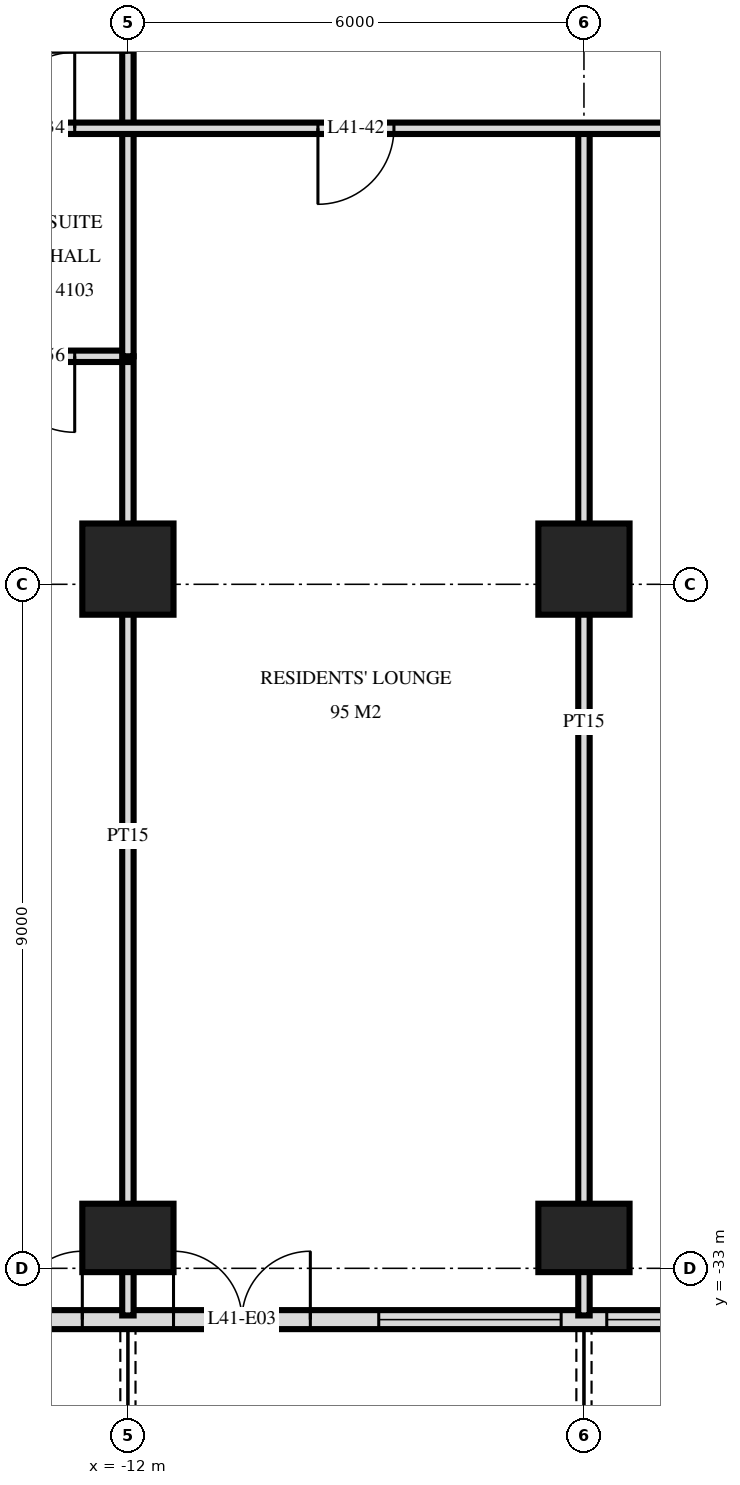
"""IFC4 building model, lengths in metres.
Left out: names, types, materials, properties, quantities, classifications, styles, units other than length and angle.
Written with IfcOpenShell. Run it as: python <this file> out.ifc"""

import sys

from ifc_helpers import new_model, si_unit, direction, frame, frame_2d, origin, origin_2d, place, context, subcontext, project, spatial, rectangle, extrude, element, fill, save


model = new_model("IFC4")
c1 = context("Model", 3, precision=1e-05, world=origin(), true_north=direction((0.0, 1.0)))
c2 = subcontext(c1, "Body", "Model", "MODEL_VIEW")
j1 = project(units=[si_unit("LENGTHUNIT", "METRE"), si_unit("PLANEANGLEUNIT", "RADIAN")], contexts=[c1])
p1 = place(None, origin())
s1 = spatial("IfcSite", under=j1, at=p1, CompositionType="ELEMENT")
p2 = place(p1, origin())
s2 = spatial("IfcBuilding", under=s1, at=p2, CompositionType="ELEMENT")
p3 = place(p2, frame((0.0, 0.0, 159.6)))
s3 = spatial("IfcBuildingStorey", under=s2, at=p3, CompositionType="ELEMENT", Elevation=159.6)
p4 = place(p3, frame((-12.0, -32.6, 0.0), z_axis=(0.0, 0.0, 1.0), x_axis=(1.0, 0.0, 0.0)))
e1 = element("IfcColumn", 1, at=p4, inside=s3, PredefinedType="COLUMN", context=c2, shape_type="SweptSolid", body=[
    extrude(rectangle(XDim=1.2, YDim=0.9, at=origin_2d()), origin(), (0.0, 0.0, 1.0), 3.6),
])
p5 = place(p3, frame((-12.0, -23.8, 0.0), z_axis=(0.0, 0.0, 1.0), x_axis=(1.0, 0.0, 0.0)))
e2 = element("IfcColumn", 2, at=p5, inside=s3, PredefinedType="COLUMN", context=c2, shape_type="SweptSolid", body=[
    extrude(rectangle(XDim=1.2, YDim=1.2, at=origin_2d()), origin(), (0.0, 0.0, 1.0), 3.6),
])
p6 = place(p3, frame((-6.0, -32.6, 0.0), z_axis=(0.0, 0.0, 1.0), x_axis=(1.0, 0.0, 0.0)))
e3 = element("IfcColumn", 3, at=p6, inside=s3, PredefinedType="COLUMN", context=c2, shape_type="SweptSolid", body=[
    extrude(rectangle(XDim=1.2, YDim=0.9, at=origin_2d()), origin(), (0.0, 0.0, 1.0), 3.6),
])
p7 = place(p3, frame((-6.0, -23.8, 0.0), z_axis=(0.0, 0.0, 1.0), x_axis=(1.0, 0.0, 0.0)))
e4 = element("IfcColumn", 4, at=p7, inside=s3, PredefinedType="COLUMN", context=c2, shape_type="SweptSolid", body=[
    extrude(rectangle(XDim=1.2, YDim=1.2, at=origin_2d()), origin(), (0.0, 0.0, 1.0), 3.6),
])
p8 = place(p3, frame((-23.675, -33.675, 0.0), z_axis=(0.0, 0.0, 1.0), x_axis=(1.0, 0.0, 0.0)))
e5 = element("IfcWall", 5, at=p8, inside=s3, PredefinedType="SOLIDWALL", context=c2, shape_type="SweptSolid", body=[
    extrude(rectangle(XDim=47.351, YDim=0.25, at=frame_2d((23.675, 0.0))), origin(), (0.0, 0.0, 1.0), 3.32),
])
p9 = place(p8, frame((0.575, 0.0, 0.0)))
e6 = element("IfcOpeningElement", 6, at=p9, cuts=e5, PredefinedType="OPENING", context=c2, shape_type="SweptSolid", body=[
    extrude(rectangle(XDim=1.8, YDim=2.4, at=frame_2d((0.9, 1.2))), frame((0.0, 0.135, 0.0), z_axis=(0.0, -1.0, 0.0), x_axis=(1.0, 0.0, 0.0)), (0.0, 0.0, 1.0), 0.27),
])
p10 = place(p8, frame((3.425, 0.0, 0.3)))
e7 = element("IfcOpeningElement", 7, at=p10, cuts=e5, PredefinedType="OPENING", context=c2, shape_type="SweptSolid", body=[
    extrude(rectangle(XDim=1.8, YDim=2.1, at=frame_2d((0.9, 1.05))), frame((0.0, 0.135, 0.0), z_axis=(0.0, -1.0, 0.0), x_axis=(1.0, 0.0, 0.0)), (0.0, 0.0, 1.0), 0.27),
])
p11 = place(p8, frame((5.975, 0.0, 0.3)))
e8 = element("IfcOpeningElement", 8, at=p11, cuts=e5, PredefinedType="OPENING", context=c2, shape_type="SweptSolid", body=[
    extrude(rectangle(XDim=2.4, YDim=2.1, at=frame_2d((1.2, 1.05))), frame((0.0, 0.135, 0.0), z_axis=(0.0, -1.0, 0.0), x_axis=(1.0, 0.0, 0.0)), (0.0, 0.0, 1.0), 0.27),
])
p12 = place(p8, frame((9.275, 0.0, 0.0)))
e9 = element("IfcOpeningElement", 9, at=p12, cuts=e5, PredefinedType="OPENING", context=c2, shape_type="SweptSolid", body=[
    extrude(rectangle(XDim=1.8, YDim=2.4, at=frame_2d((0.9, 1.2))), frame((0.0, 0.135, 0.0), z_axis=(0.0, -1.0, 0.0), x_axis=(1.0, 0.0, 0.0)), (0.0, 0.0, 1.0), 0.27),
])
p13 = place(p8, frame((12.275, 0.0, 0.0)))
e10 = element("IfcOpeningElement", 10, at=p13, cuts=e5, PredefinedType="OPENING", context=c2, shape_type="SweptSolid", body=[
    extrude(rectangle(XDim=1.8, YDim=2.4, at=frame_2d((0.9, 1.2))), frame((0.0, 0.135, 0.0), z_axis=(0.0, -1.0, 0.0), x_axis=(1.0, 0.0, 0.0)), (0.0, 0.0, 1.0), 0.27),
])
p14 = place(p8, frame((14.975, 0.0, 0.3)))
e11 = element("IfcOpeningElement", 11, at=p14, cuts=e5, PredefinedType="OPENING", context=c2, shape_type="SweptSolid", body=[
    extrude(rectangle(XDim=2.4, YDim=2.1, at=frame_2d((1.2, 1.05))), frame((0.0, 0.135, 0.0), z_axis=(0.0, -1.0, 0.0), x_axis=(1.0, 0.0, 0.0)), (0.0, 0.0, 1.0), 0.27),
])
p15 = place(p8, frame((17.975, 0.0, 0.3)))
e12 = element("IfcOpeningElement", 12, at=p15, cuts=e5, PredefinedType="OPENING", context=c2, shape_type="SweptSolid", body=[
    extrude(rectangle(XDim=2.4, YDim=2.1, at=frame_2d((1.2, 1.05))), frame((0.0, 0.135, 0.0), z_axis=(0.0, -1.0, 0.0), x_axis=(1.0, 0.0, 0.0)), (0.0, 0.0, 1.0), 0.27),
])
p16 = place(p8, frame((21.275, 0.0, 0.0)))
e13 = element("IfcOpeningElement", 13, at=p16, cuts=e5, PredefinedType="OPENING", context=c2, shape_type="SweptSolid", body=[
    extrude(rectangle(XDim=1.8, YDim=2.4, at=frame_2d((0.9, 1.2))), frame((0.0, 0.135, 0.0), z_axis=(0.0, -1.0, 0.0), x_axis=(1.0, 0.0, 0.0)), (0.0, 0.0, 1.0), 0.27),
])
p17 = place(p8, frame((24.275, 0.0, 0.0)))
e14 = element("IfcOpeningElement", 14, at=p17, cuts=e5, PredefinedType="OPENING", context=c2, shape_type="SweptSolid", body=[
    extrude(rectangle(XDim=1.8, YDim=2.4, at=frame_2d((0.9, 1.2))), frame((0.0, 0.135, 0.0), z_axis=(0.0, -1.0, 0.0), x_axis=(1.0, 0.0, 0.0)), (0.0, 0.0, 1.0), 0.27),
])
p18 = place(p8, frame((26.975, 0.0, 0.3)))
e15 = element("IfcOpeningElement", 15, at=p18, cuts=e5, PredefinedType="OPENING", context=c2, shape_type="SweptSolid", body=[
    extrude(rectangle(XDim=2.4, YDim=2.1, at=frame_2d((1.2, 1.05))), frame((0.0, 0.135, 0.0), z_axis=(0.0, -1.0, 0.0), x_axis=(1.0, 0.0, 0.0)), (0.0, 0.0, 1.0), 0.27),
])
p19 = place(p8, frame((30.275, 0.0, 0.0)))
e16 = element("IfcOpeningElement", 16, at=p19, cuts=e5, PredefinedType="OPENING", context=c2, shape_type="SweptSolid", body=[
    extrude(rectangle(XDim=1.8, YDim=2.4, at=frame_2d((0.9, 1.2))), frame((0.0, 0.135, 0.0), z_axis=(0.0, -1.0, 0.0), x_axis=(1.0, 0.0, 0.0)), (0.0, 0.0, 1.0), 0.27),
])
p20 = place(p8, frame((32.975, 0.0, 0.3)))
e17 = element("IfcOpeningElement", 17, at=p20, cuts=e5, PredefinedType="OPENING", context=c2, shape_type="SweptSolid", body=[
    extrude(rectangle(XDim=2.4, YDim=2.1, at=frame_2d((1.2, 1.05))), frame((0.0, 0.135, 0.0), z_axis=(0.0, -1.0, 0.0), x_axis=(1.0, 0.0, 0.0)), (0.0, 0.0, 1.0), 0.27),
])
p21 = place(p8, frame((36.275, 0.0, 0.0)))
e18 = element("IfcOpeningElement", 18, at=p21, cuts=e5, PredefinedType="OPENING", context=c2, shape_type="SweptSolid", body=[
    extrude(rectangle(XDim=1.8, YDim=2.4, at=frame_2d((0.9, 1.2))), frame((0.0, 0.135, 0.0), z_axis=(0.0, -1.0, 0.0), x_axis=(1.0, 0.0, 0.0)), (0.0, 0.0, 1.0), 0.27),
])
p22 = place(p8, frame((38.975, 0.0, 0.3)))
e19 = element("IfcOpeningElement", 19, at=p22, cuts=e5, PredefinedType="OPENING", context=c2, shape_type="SweptSolid", body=[
    extrude(rectangle(XDim=2.4, YDim=2.1, at=frame_2d((1.2, 1.05))), frame((0.0, 0.135, 0.0), z_axis=(0.0, -1.0, 0.0), x_axis=(1.0, 0.0, 0.0)), (0.0, 0.0, 1.0), 0.27),
])
p23 = place(p8, frame((41.975, 0.0, 0.3)))
e20 = element("IfcOpeningElement", 20, at=p23, cuts=e5, PredefinedType="OPENING", context=c2, shape_type="SweptSolid", body=[
    extrude(rectangle(XDim=2.4, YDim=2.1, at=frame_2d((1.2, 1.05))), frame((0.0, 0.135, 0.0), z_axis=(0.0, -1.0, 0.0), x_axis=(1.0, 0.0, 0.0)), (0.0, 0.0, 1.0), 0.27),
])
p24 = place(p8, frame((45.125, 0.0, 0.0)))
e21 = element("IfcOpeningElement", 21, at=p24, cuts=e5, PredefinedType="OPENING", context=c2, shape_type="SweptSolid", body=[
    extrude(rectangle(XDim=1.8, YDim=2.4, at=frame_2d((0.9, 1.2))), frame((0.0, 0.135, 0.0), z_axis=(0.0, -1.0, 0.0), x_axis=(1.0, 0.0, 0.0)), (0.0, 0.0, 1.0), 0.27),
])
p25 = place(p3, frame((-6.0, -33.62, 0.0), z_axis=(0.0, 0.0, 1.0), x_axis=(0.0, 1.0, 0.0)))
e22 = element("IfcWall", 22, at=p25, inside=s3, PredefinedType="PARTITIONING", context=c2, shape_type="SweptSolid", body=[
    extrude(rectangle(XDim=15.62, YDim=0.15, at=frame_2d((7.81, 0.0))), origin(), (0.0, 0.0, 1.0), 3.32),
])
p26 = place(p3, frame((-12.0, -21.0, 0.0), z_axis=(0.0, 0.0, 1.0), x_axis=(0.0, 1.0, 0.0)))
e23 = element("IfcWall", 23, at=p26, inside=s3, PredefinedType="PARTITIONING", context=c2, shape_type="SweptSolid", body=[
    extrude(rectangle(XDim=5.95, YDim=0.15, at=frame_2d((2.975, 0.0))), origin(), (0.0, 0.0, 1.0), 3.32),
])
p27 = place(p26, frame((4.0, 0.0, 0.0)))
e24 = element("IfcOpeningElement", 24, at=p27, cuts=e23, PredefinedType="OPENING", context=c2, shape_type="SweptSolid", body=[
    extrude(rectangle(XDim=1.0, YDim=2.1, at=frame_2d((0.5, 1.05))), frame((0.0, 0.085, 0.0), z_axis=(0.0, -1.0, 0.0), x_axis=(1.0, 0.0, 0.0)), (0.0, 0.0, 1.0), 0.17),
])
p28 = place(p3, frame((-12.0, -33.62, 0.0), z_axis=(0.0, 0.0, 1.0), x_axis=(0.0, 1.0, 0.0)))
e25 = element("IfcWall", 25, at=p28, inside=s3, PredefinedType="PARTITIONING", context=c2, shape_type="SweptSolid", body=[
    extrude(rectangle(XDim=12.62, YDim=0.15, at=frame_2d((6.31, 0.0))), origin(), (0.0, 0.0, 1.0), 3.32),
])
p29 = place(p3, frame((-14.4, -21.0, 0.0), z_axis=(0.0, 0.0, 1.0), x_axis=(1.0, 0.0, 0.0)))
e26 = element("IfcWall", 26, at=p29, inside=s3, PredefinedType="PARTITIONING", context=c2, shape_type="SweptSolid", body=[
    extrude(rectangle(XDim=2.4, YDim=0.15, at=frame_2d((1.2, 0.0))), origin(), (0.0, 0.0, 1.0), 3.32),
])
p30 = place(p29, frame((0.7, 0.0, 0.0)))
e27 = element("IfcOpeningElement", 27, at=p30, cuts=e26, PredefinedType="OPENING", context=c2, shape_type="SweptSolid", body=[
    extrude(rectangle(XDim=1.0, YDim=2.1, at=frame_2d((0.5, 1.05))), frame((0.0, 0.085, 0.0), z_axis=(0.0, -1.0, 0.0), x_axis=(1.0, 0.0, 0.0)), (0.0, 0.0, 1.0), 0.17),
])
p31 = place(p3, frame((-28.02, -18.0, 0.0), z_axis=(0.0, 0.0, 1.0), x_axis=(1.0, 0.0, 0.0)))
e28 = element("IfcWall", 28, at=p31, inside=s3, PredefinedType="PARTITIONING", context=c2, shape_type="SweptSolid", body=[
    extrude(rectangle(XDim=56.04, YDim=0.15, at=frame_2d((28.02, 0.0))), origin(), (0.0, 0.0, 1.0), 3.32),
])
p32 = place(p31, frame((14.32, 0.0, 0.0)))
e29 = element("IfcOpeningElement", 29, at=p32, cuts=e28, PredefinedType="OPENING", context=c2, shape_type="SweptSolid", body=[
    extrude(rectangle(XDim=1.0, YDim=2.1, at=frame_2d((0.5, 1.05))), frame((0.0, 0.085, 0.0), z_axis=(0.0, -1.0, 0.0), x_axis=(1.0, 0.0, 0.0)), (0.0, 0.0, 1.0), 0.17),
])
p33 = place(p31, frame((40.17, 0.0, 0.0)))
e30 = element("IfcOpeningElement", 30, at=p33, cuts=e28, PredefinedType="OPENING", context=c2, shape_type="SweptSolid", body=[
    extrude(rectangle(XDim=1.0, YDim=2.1, at=frame_2d((0.5, 1.05))), frame((0.0, 0.085, 0.0), z_axis=(0.0, -1.0, 0.0), x_axis=(1.0, 0.0, 0.0)), (0.0, 0.0, 1.0), 0.17),
])
p34 = place(p31, frame((44.87, 0.0, 0.0)))
e31 = element("IfcOpeningElement", 31, at=p34, cuts=e28, PredefinedType="OPENING", context=c2, shape_type="SweptSolid", body=[
    extrude(rectangle(XDim=1.0, YDim=2.1, at=frame_2d((0.5, 1.05))), frame((0.0, 0.085, 0.0), z_axis=(0.0, -1.0, 0.0), x_axis=(1.0, 0.0, 0.0)), (0.0, 0.0, 1.0), 0.17),
])
p35 = place(p31, frame((46.72, 0.0, 0.0)))
e32 = element("IfcOpeningElement", 32, at=p35, cuts=e28, PredefinedType="OPENING", context=c2, shape_type="SweptSolid", body=[
    extrude(rectangle(XDim=1.0, YDim=2.1, at=frame_2d((0.5, 1.05))), frame((0.0, 0.085, 0.0), z_axis=(0.0, -1.0, 0.0), x_axis=(1.0, 0.0, 0.0)), (0.0, 0.0, 1.0), 0.17),
])
p36 = place(p31, frame((18.52, 0.0, 0.0)))
e33 = element("IfcOpeningElement", 33, at=p36, cuts=e28, PredefinedType="OPENING", context=c2, shape_type="SweptSolid", body=[
    extrude(rectangle(XDim=1.0, YDim=2.1, at=frame_2d((0.5, 1.05))), frame((0.0, 0.085, 0.0), z_axis=(0.0, -1.0, 0.0), x_axis=(1.0, 0.0, 0.0)), (0.0, 0.0, 1.0), 0.17),
])
p37 = place(p31, frame((24.52, 0.0, 0.0)))
e34 = element("IfcOpeningElement", 34, at=p37, cuts=e28, PredefinedType="OPENING", context=c2, shape_type="SweptSolid", body=[
    extrude(rectangle(XDim=1.0, YDim=2.1, at=frame_2d((0.5, 1.05))), frame((0.0, 0.085, 0.0), z_axis=(0.0, -1.0, 0.0), x_axis=(1.0, 0.0, 0.0)), (0.0, 0.0, 1.0), 0.17),
])
p38 = place(p31, frame((30.52, 0.0, 0.0)))
e35 = element("IfcOpeningElement", 35, at=p38, cuts=e28, PredefinedType="OPENING", context=c2, shape_type="SweptSolid", body=[
    extrude(rectangle(XDim=1.0, YDim=2.1, at=frame_2d((0.5, 1.05))), frame((0.0, 0.085, 0.0), z_axis=(0.0, -1.0, 0.0), x_axis=(1.0, 0.0, 0.0)), (0.0, 0.0, 1.0), 0.17),
])
p39 = place(p31, frame((36.52, 0.0, 0.0)))
e36 = element("IfcOpeningElement", 36, at=p39, cuts=e28, PredefinedType="OPENING", context=c2, shape_type="SweptSolid", body=[
    extrude(rectangle(XDim=1.0, YDim=2.1, at=frame_2d((0.5, 1.05))), frame((0.0, 0.085, 0.0), z_axis=(0.0, -1.0, 0.0), x_axis=(1.0, 0.0, 0.0)), (0.0, 0.0, 1.0), 0.17),
])
p40 = place(p12, origin())
e37 = element("IfcDoor", 37, at=p40, inside=s3, OperationType="DOUBLE_DOOR_SINGLE_SWING", PredefinedType="DOOR", context=c2, shape_type="SweptSolid", body=[
    extrude(rectangle(XDim=1.8, YDim=2.4, at=frame_2d((0.9, 1.2))), frame((0.0, 0.025, 0.0), z_axis=(0.0, -1.0, 0.0), x_axis=(1.0, 0.0, 0.0)), (0.0, 0.0, 1.0), 0.05),
])
fill(e9, e37)
p41 = place(p13, origin())
e38 = element("IfcDoor", 38, at=p41, inside=s3, OperationType="DOUBLE_DOOR_SINGLE_SWING", PredefinedType="DOOR", context=c2, shape_type="SweptSolid", body=[
    extrude(rectangle(XDim=1.8, YDim=2.4, at=frame_2d((0.9, 1.2))), frame((0.0, 0.025, 0.0), z_axis=(0.0, -1.0, 0.0), x_axis=(1.0, 0.0, 0.0)), (0.0, 0.0, 1.0), 0.05),
])
fill(e10, e38)
p42 = place(p14, origin())
e39 = element("IfcWindow", 39, at=p42, inside=s3, PartitioningType="SINGLE_PANEL", PredefinedType="WINDOW", context=c2, shape_type="SweptSolid", body=[
    extrude(rectangle(XDim=2.4, YDim=2.1, at=frame_2d((1.2, 1.05))), frame((0.0, 0.03, 0.0), z_axis=(0.0, -1.0, 0.0), x_axis=(1.0, 0.0, 0.0)), (0.0, 0.0, 1.0), 0.06),
])
fill(e11, e39)
p43 = place(p15, origin())
e40 = element("IfcWindow", 40, at=p43, inside=s3, PartitioningType="SINGLE_PANEL", PredefinedType="WINDOW", context=c2, shape_type="SweptSolid", body=[
    extrude(rectangle(XDim=2.4, YDim=2.1, at=frame_2d((1.2, 1.05))), frame((0.0, 0.03, 0.0), z_axis=(0.0, -1.0, 0.0), x_axis=(1.0, 0.0, 0.0)), (0.0, 0.0, 1.0), 0.06),
])
fill(e12, e40)
p44 = place(p32, origin())
e41 = element("IfcDoor", 41, at=p44, inside=s3, OperationType="SINGLE_SWING_LEFT", PredefinedType="DOOR", context=c2, shape_type="SweptSolid", body=[
    extrude(rectangle(XDim=1.0, YDim=2.1, at=frame_2d((0.5, 1.05))), frame((0.0, 0.025, 0.0), z_axis=(0.0, -1.0, 0.0), x_axis=(1.0, 0.0, 0.0)), (0.0, 0.0, 1.0), 0.05),
])
fill(e29, e41)
p45 = place(p36, frame((0.5, 0.0, 0.0), z_axis=(0.0, 0.0, 1.0), x_axis=(-1.0, 0.0, 0.0)))
e42 = element("IfcDoor", 42, at=p45, inside=s3, OperationType="SINGLE_SWING_LEFT", PredefinedType="DOOR", context=c2, shape_type="SweptSolid", body=[
    extrude(rectangle(XDim=1.0, YDim=2.1, at=frame_2d((0.0, 1.05))), frame((0.0, -0.025, 0.0), z_axis=(0.0, 1.0, 0.0), x_axis=(-1.0, 0.0, 0.0)), (0.0, 0.0, 1.0), 0.05),
])
fill(e33, e42)
p46 = place(p30, frame((0.5, 0.0, 0.0), z_axis=(0.0, 0.0, 1.0), x_axis=(-1.0, 0.0, 0.0)))
e43 = element("IfcDoor", 43, at=p46, inside=s3, OperationType="SINGLE_SWING_RIGHT", PredefinedType="DOOR", context=c2, shape_type="SweptSolid", body=[
    extrude(rectangle(XDim=1.0, YDim=2.1, at=frame_2d((0.0, 1.05))), frame((0.0, -0.025, 0.0), z_axis=(0.0, 1.0, 0.0), x_axis=(-1.0, 0.0, 0.0)), (0.0, 0.0, 1.0), 0.05),
])
fill(e27, e43)
save(model, sys.argv[1])
